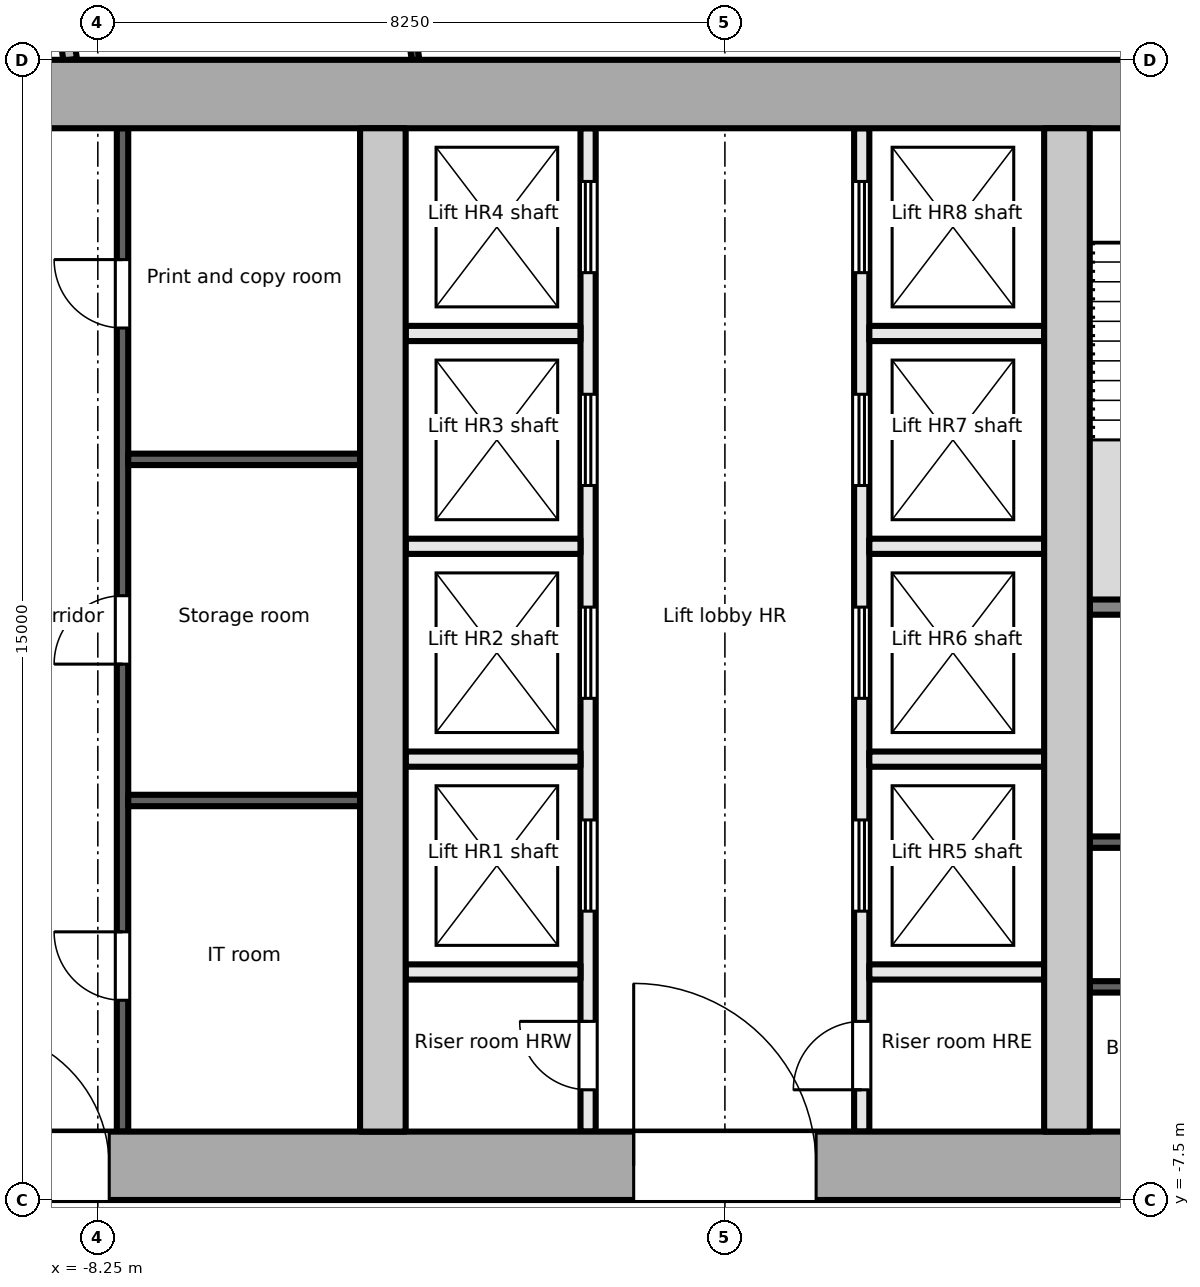
"""IFC4 building model, lengths in metres.
Left out: names, types, materials, properties, quantities, classifications, styles, units other than length and angle.
Written with IfcOpenShell. Run it as: python <this file> out.ifc"""

import sys

from ifc_helpers import new_model, si_unit, direction, frame, frame_2d, origin, place, context, subcontext, project, spatial, rectangle, extrude, element, fill, save


model = new_model("IFC4")
c1 = context("Model", 3, precision=1e-05, world=origin(), true_north=direction((0.0, 1.0)))
c2 = subcontext(c1, "Body", "Model", "MODEL_VIEW")
j1 = project(units=[si_unit("LENGTHUNIT", "METRE"), si_unit("PLANEANGLEUNIT", "RADIAN")], contexts=[c1])
p1 = place(None, origin())
s1 = spatial("IfcSite", under=j1, at=p1, CompositionType="ELEMENT")
p2 = place(p1, origin())
s2 = spatial("IfcBuilding", under=s1, at=p2, CompositionType="ELEMENT")
p3 = place(p2, frame((0.0, 0.0, 259.0)))
s3 = spatial("IfcBuildingStorey", under=s2, at=p3, CompositionType="ELEMENT", Elevation=259.0)
p4 = place(p3, frame((-18.0, -7.05, -0.2), z_axis=(0.0, 0.0, 1.0), x_axis=(1.0, 0.0, 0.0)))
e1 = element("IfcWall", 1, at=p4, inside=s3, PredefinedType="SHEAR", context=c2, shape_type="SweptSolid", body=[
    extrude(rectangle(XDim=36.0, YDim=0.9, at=frame_2d((18.0, 0.0))), origin(), (0.0, 0.0, 1.0), 3.9),
])
p5 = place(p4, frame((8.1, 0.0, 0.2)))
e2 = element("IfcOpeningElement", 2, at=p5, cuts=e1, PredefinedType="OPENING", context=c2, shape_type="SweptSolid", body=[
    extrude(rectangle(XDim=1.8, YDim=2.1, at=frame_2d((0.9, 1.05))), frame((0.0, 0.46, 0.0), z_axis=(0.0, -1.0, 0.0), x_axis=(1.0, 0.0, 0.0)), (0.0, 0.0, 1.0), 0.921),
])
p6 = place(p4, frame((16.8, 0.0, 0.2)))
e3 = element("IfcOpeningElement", 3, at=p6, cuts=e1, PredefinedType="OPENING", context=c2, shape_type="SweptSolid", body=[
    extrude(rectangle(XDim=2.4, YDim=2.1, at=frame_2d((1.2, 1.05))), frame((0.0, 0.46, 0.0), z_axis=(0.0, -1.0, 0.0), x_axis=(1.0, 0.0, 0.0)), (0.0, 0.0, 1.0), 0.921),
])
p7 = place(p4, frame((26.1, 0.0, 0.2)))
e4 = element("IfcOpeningElement", 4, at=p7, cuts=e1, PredefinedType="OPENING", context=c2, shape_type="SweptSolid", body=[
    extrude(rectangle(XDim=2.4, YDim=2.1, at=frame_2d((1.2, 1.05))), frame((0.0, 0.46, 0.0), z_axis=(0.0, -1.0, 0.0), x_axis=(1.0, 0.0, 0.0)), (0.0, 0.0, 1.0), 0.921),
])
p8 = place(p3, frame((-18.0, 7.05, -0.2), z_axis=(0.0, 0.0, 1.0), x_axis=(1.0, 0.0, 0.0)))
e5 = element("IfcWall", 5, at=p8, inside=s3, PredefinedType="SHEAR", context=c2, shape_type="SweptSolid", body=[
    extrude(rectangle(XDim=36.0, YDim=0.9, at=frame_2d((18.0, 0.0))), origin(), (0.0, 0.0, 1.0), 3.9),
])
for number, where, z_axis, x_axis in (
    (6, (-4.5, -6.6, -0.2), (0.0, 0.0, 1.0), (0.0, 1.0, 0.0)),
    (7, (4.5, -6.6, -0.2), (0.0, 0.0, 1.0), (0.0, 1.0, 0.0)),
):
    element("IfcWall", number, at=place(p3, frame(where, z_axis=z_axis, x_axis=x_axis)), inside=s3, PredefinedType="SHEAR", context=c2, shape_type="SweptSolid", body=[
        extrude(rectangle(XDim=13.2, YDim=0.6, at=frame_2d((6.6, 0.0))), origin(), (0.0, 0.0, 1.0), 3.9),
    ])
p9 = place(p3, frame((-7.925, -6.6, 0.0), z_axis=(0.0, 0.0, 1.0), x_axis=(0.0, 1.0, 0.0)))
e8 = element("IfcWall", 8, at=p9, inside=s3, PredefinedType="PARTITIONING", context=c2, shape_type="SweptSolid", body=[
    extrude(rectangle(XDim=13.2, YDim=0.15, at=frame_2d((6.6, 0.0))), origin(), (0.0, 0.0, 1.0), 3.7),
])
p10 = place(p9, frame((1.728, 0.0, 0.0)))
e9 = element("IfcOpeningElement", 9, at=p10, cuts=e8, PredefinedType="OPENING", context=c2, shape_type="SweptSolid", body=[
    extrude(rectangle(XDim=0.9, YDim=2.1, at=frame_2d((0.45, 1.05))), frame((0.0, 0.085, 0.0), z_axis=(0.0, -1.0, 0.0), x_axis=(1.0, 0.0, 0.0)), (0.0, 0.0, 1.0), 0.171),
])
p11 = place(p9, frame((6.15, 0.0, 0.0)))
e10 = element("IfcOpeningElement", 10, at=p11, cuts=e8, PredefinedType="OPENING", context=c2, shape_type="SweptSolid", body=[
    extrude(rectangle(XDim=0.9, YDim=2.1, at=frame_2d((0.45, 1.05))), frame((0.0, 0.085, 0.0), z_axis=(0.0, -1.0, 0.0), x_axis=(1.0, 0.0, 0.0)), (0.0, 0.0, 1.0), 0.171),
])
p12 = place(p9, frame((10.572, 0.0, 0.0)))
e11 = element("IfcOpeningElement", 11, at=p12, cuts=e8, PredefinedType="OPENING", context=c2, shape_type="SweptSolid", body=[
    extrude(rectangle(XDim=0.9, YDim=2.1, at=frame_2d((0.45, 1.05))), frame((0.0, 0.085, 0.0), z_axis=(0.0, -1.0, 0.0), x_axis=(1.0, 0.0, 0.0)), (0.0, 0.0, 1.0), 0.171),
])
for number, where, z_axis, x_axis in (
    (12, (-7.85, -2.244, 0.0), (0.0, 0.0, 1.0), (1.0, 0.0, 0.0)),
    (13, (-7.85, 2.244, 0.0), (0.0, 0.0, 1.0), (1.0, 0.0, 0.0)),
):
    element("IfcWall", number, at=place(p3, frame(where, z_axis=z_axis, x_axis=x_axis)), inside=s3, PredefinedType="PARTITIONING", context=c2, shape_type="SweptSolid", body=[
        extrude(rectangle(XDim=3.05, YDim=0.15, at=frame_2d((1.525, 0.0))), origin(), (0.0, 0.0, 1.0), 3.7),
    ])
p13 = place(p3, frame((-1.8, -6.6, 0.0), z_axis=(0.0, 0.0, 1.0), x_axis=(0.0, 1.0, 0.0)))
e14 = element("IfcWall", 14, at=p13, inside=s3, PredefinedType="PARTITIONING", context=c2, shape_type="SweptSolid", body=[
    extrude(rectangle(XDim=13.2, YDim=0.2, at=frame_2d((6.6, 0.0))), origin(), (0.0, 0.0, 1.0), 3.7),
])
p14 = place(p13, frame((0.55, 0.0, 0.0)))
e15 = element("IfcOpeningElement", 15, at=p14, cuts=e14, PredefinedType="OPENING", context=c2, shape_type="SweptSolid", body=[
    extrude(rectangle(XDim=0.9, YDim=2.1, at=frame_2d((0.45, 1.05))), frame((0.0, 0.111, 0.0), z_axis=(0.0, -1.0, 0.0), x_axis=(1.0, 0.0, 0.0)), (0.0, 0.0, 1.0), 0.221),
])
p15 = place(p13, frame((2.9, 0.0, 0.0)))
e16 = element("IfcOpeningElement", 16, at=p15, cuts=e14, PredefinedType="OPENING", context=c2, shape_type="SweptSolid", body=[
    extrude(rectangle(XDim=1.2, YDim=2.1, at=frame_2d((0.6, 1.05))), frame((0.0, 0.111, 0.0), z_axis=(0.0, -1.0, 0.0), x_axis=(1.0, 0.0, 0.0)), (0.0, 0.0, 1.0), 0.221),
])
p16 = place(p13, frame((5.7, 0.0, 0.0)))
e17 = element("IfcOpeningElement", 17, at=p16, cuts=e14, PredefinedType="OPENING", context=c2, shape_type="SweptSolid", body=[
    extrude(rectangle(XDim=1.2, YDim=2.1, at=frame_2d((0.6, 1.05))), frame((0.0, 0.111, 0.0), z_axis=(0.0, -1.0, 0.0), x_axis=(1.0, 0.0, 0.0)), (0.0, 0.0, 1.0), 0.221),
])
p17 = place(p13, frame((8.5, 0.0, 0.0)))
e18 = element("IfcOpeningElement", 18, at=p17, cuts=e14, PredefinedType="OPENING", context=c2, shape_type="SweptSolid", body=[
    extrude(rectangle(XDim=1.2, YDim=2.1, at=frame_2d((0.6, 1.05))), frame((0.0, 0.111, 0.0), z_axis=(0.0, -1.0, 0.0), x_axis=(1.0, 0.0, 0.0)), (0.0, 0.0, 1.0), 0.221),
])
p18 = place(p13, frame((11.3, 0.0, 0.0)))
e19 = element("IfcOpeningElement", 19, at=p18, cuts=e14, PredefinedType="OPENING", context=c2, shape_type="SweptSolid", body=[
    extrude(rectangle(XDim=1.2, YDim=2.1, at=frame_2d((0.6, 1.05))), frame((0.0, 0.111, 0.0), z_axis=(0.0, -1.0, 0.0), x_axis=(1.0, 0.0, 0.0)), (0.0, 0.0, 1.0), 0.221),
])
p19 = place(p3, frame((1.8, -6.6, 0.0), z_axis=(0.0, 0.0, 1.0), x_axis=(0.0, 1.0, 0.0)))
e20 = element("IfcWall", 20, at=p19, inside=s3, PredefinedType="PARTITIONING", context=c2, shape_type="SweptSolid", body=[
    extrude(rectangle(XDim=13.2, YDim=0.2, at=frame_2d((6.6, 0.0))), origin(), (0.0, 0.0, 1.0), 3.7),
])
p20 = place(p19, frame((0.55, 0.0, 0.0)))
e21 = element("IfcOpeningElement", 21, at=p20, cuts=e20, PredefinedType="OPENING", context=c2, shape_type="SweptSolid", body=[
    extrude(rectangle(XDim=0.9, YDim=2.1, at=frame_2d((0.45, 1.05))), frame((0.0, 0.111, 0.0), z_axis=(0.0, -1.0, 0.0), x_axis=(1.0, 0.0, 0.0)), (0.0, 0.0, 1.0), 0.221),
])
p21 = place(p19, frame((2.9, 0.0, 0.0)))
e22 = element("IfcOpeningElement", 22, at=p21, cuts=e20, PredefinedType="OPENING", context=c2, shape_type="SweptSolid", body=[
    extrude(rectangle(XDim=1.2, YDim=2.1, at=frame_2d((0.6, 1.05))), frame((0.0, 0.111, 0.0), z_axis=(0.0, -1.0, 0.0), x_axis=(1.0, 0.0, 0.0)), (0.0, 0.0, 1.0), 0.221),
])
p22 = place(p19, frame((5.7, 0.0, 0.0)))
e23 = element("IfcOpeningElement", 23, at=p22, cuts=e20, PredefinedType="OPENING", context=c2, shape_type="SweptSolid", body=[
    extrude(rectangle(XDim=1.2, YDim=2.1, at=frame_2d((0.6, 1.05))), frame((0.0, 0.111, 0.0), z_axis=(0.0, -1.0, 0.0), x_axis=(1.0, 0.0, 0.0)), (0.0, 0.0, 1.0), 0.221),
])
p23 = place(p19, frame((8.5, 0.0, 0.0)))
e24 = element("IfcOpeningElement", 24, at=p23, cuts=e20, PredefinedType="OPENING", context=c2, shape_type="SweptSolid", body=[
    extrude(rectangle(XDim=1.2, YDim=2.1, at=frame_2d((0.6, 1.05))), frame((0.0, 0.111, 0.0), z_axis=(0.0, -1.0, 0.0), x_axis=(1.0, 0.0, 0.0)), (0.0, 0.0, 1.0), 0.221),
])
p24 = place(p19, frame((11.3, 0.0, 0.0)))
e25 = element("IfcOpeningElement", 25, at=p24, cuts=e20, PredefinedType="OPENING", context=c2, shape_type="SweptSolid", body=[
    extrude(rectangle(XDim=1.2, YDim=2.1, at=frame_2d((0.6, 1.05))), frame((0.0, 0.111, 0.0), z_axis=(0.0, -1.0, 0.0), x_axis=(1.0, 0.0, 0.0)), (0.0, 0.0, 1.0), 0.221),
])
for number, where, z_axis, x_axis in (
    (26, (-4.2, -1.7, 0.0), (0.0, 0.0, 1.0), (1.0, 0.0, 0.0)),
    (27, (-4.2, 1.1, 0.0), (0.0, 0.0, 1.0), (1.0, 0.0, 0.0)),
    (28, (-4.2, 3.9, 0.0), (0.0, 0.0, 1.0), (1.0, 0.0, 0.0)),
    (29, (-4.2, -4.5, 0.0), (0.0, 0.0, 1.0), (1.0, 0.0, 0.0)),
    (30, (1.9, -1.7, 0.0), (0.0, 0.0, 1.0), (1.0, 0.0, 0.0)),
    (31, (1.9, 1.1, 0.0), (0.0, 0.0, 1.0), (1.0, 0.0, 0.0)),
    (32, (1.9, 3.9, 0.0), (0.0, 0.0, 1.0), (1.0, 0.0, 0.0)),
    (33, (1.9, -4.5, 0.0), (0.0, 0.0, 1.0), (1.0, 0.0, 0.0)),
):
    element("IfcWall", number, at=place(p3, frame(where, z_axis=z_axis, x_axis=x_axis)), inside=s3, PredefinedType="PARTITIONING", context=c2, shape_type="SweptSolid", body=[
        extrude(rectangle(XDim=2.3, YDim=0.2, at=frame_2d((1.15, 0.0))), origin(), (0.0, 0.0, 1.0), 3.7),
    ])
p25 = place(p3, frame((4.8, 0.3, 0.0), z_axis=(0.0, 0.0, 1.0), x_axis=(1.0, 0.0, 0.0)))
e34 = element("IfcWall", 34, at=p25, inside=s3, PredefinedType="PARTITIONING", context=c2, shape_type="SweptSolid", body=[
    extrude(rectangle(XDim=3.15, YDim=0.2, at=frame_2d((1.575, 0.0))), origin(), (0.0, 0.0, 1.0), 3.7),
])
for number, where, z_axis, x_axis in (
    (35, (4.8, -4.696, 0.0), (0.0, 0.0, 1.0), (1.0, 0.0, 0.0)),
    (36, (4.8, -2.792, 0.0), (0.0, 0.0, 1.0), (1.0, 0.0, 0.0)),
):
    element("IfcWall", number, at=place(p3, frame(where, z_axis=z_axis, x_axis=x_axis)), inside=s3, PredefinedType="PARTITIONING", context=c2, shape_type="SweptSolid", body=[
        extrude(rectangle(XDim=3.15, YDim=0.15, at=frame_2d((1.575, 0.0))), origin(), (0.0, 0.0, 1.0), 3.7),
    ])
p26 = place(p3, frame((-9.273, 12.191, 0.0), z_axis=(0.0, 0.0, 1.0), x_axis=(0.139104789371, -0.990277666907, 0.0)))
e37 = element("IfcWall", 37, at=p26, inside=s3, PredefinedType="PARTITIONING", context=c2, shape_type="SweptSolid", body=[
    extrude(rectangle(XDim=4.737, YDim=0.18, at=frame_2d((2.369, 0.0))), origin(), (0.0, 0.0, 1.0), 3.4),
])
p27 = place(p3, frame((-4.07, 7.5, 0.0), z_axis=(0.0, 0.0, 1.0), x_axis=(-0.139122430522, 0.990275188685, 0.0)))
e38 = element("IfcWall", 38, at=p27, inside=s3, PredefinedType="PARTITIONING", context=c2, shape_type="SweptSolid", body=[
    extrude(rectangle(XDim=5.368, YDim=0.1, at=frame_2d((2.684, 0.0))), origin(), (0.0, 0.0, 1.0), 3.4),
])
p28 = place(p27, frame((3.098, 0.0, 0.0)))
e39 = element("IfcOpeningElement", 39, at=p28, cuts=e38, PredefinedType="OPENING", context=c2, shape_type="SweptSolid", body=[
    extrude(rectangle(XDim=0.8, YDim=2.1, at=frame_2d((0.4, 1.05))), frame((0.0, 0.061, 0.0), z_axis=(0.0, -1.0, 0.0), x_axis=(1.0, 0.0, 0.0)), (0.0, 0.0, 1.0), 0.121),
])
p29 = place(p27, frame((0.649, 0.0, 0.9)))
e40 = element("IfcOpeningElement", 40, at=p29, cuts=e38, PredefinedType="OPENING", context=c2, shape_type="SweptSolid", body=[
    extrude(rectangle(XDim=1.8, YDim=1.2, at=frame_2d((0.9, 0.6))), frame((0.0, 0.061, 0.0), z_axis=(0.0, -1.0, 0.0), x_axis=(1.0, 0.0, 0.0)), (0.0, 0.0, 1.0), 0.121),
])
p30 = place(p10, origin())
e41 = element("IfcDoor", 41, at=p30, inside=s3, OperationType="SINGLE_SWING_RIGHT", PredefinedType="DOOR", context=c2, shape_type="SweptSolid", body=[
    extrude(rectangle(XDim=0.9, YDim=2.1, at=frame_2d((0.45, 1.05))), frame((0.0, 0.025, 0.0), z_axis=(0.0, -1.0, 0.0), x_axis=(1.0, 0.0, 0.0)), (0.0, 0.0, 1.0), 0.05),
])
fill(e9, e41)
p31 = place(p11, origin())
e42 = element("IfcDoor", 42, at=p31, inside=s3, OperationType="SINGLE_SWING_LEFT", PredefinedType="DOOR", context=c2, shape_type="SweptSolid", body=[
    extrude(rectangle(XDim=0.9, YDim=2.1, at=frame_2d((0.45, 1.05))), frame((0.0, 0.025, 0.0), z_axis=(0.0, -1.0, 0.0), x_axis=(1.0, 0.0, 0.0)), (0.0, 0.0, 1.0), 0.05),
])
fill(e10, e42)
p32 = place(p12, origin())
e43 = element("IfcDoor", 43, at=p32, inside=s3, OperationType="SINGLE_SWING_RIGHT", PredefinedType="DOOR", context=c2, shape_type="SweptSolid", body=[
    extrude(rectangle(XDim=0.9, YDim=2.1, at=frame_2d((0.45, 1.05))), frame((0.0, 0.025, 0.0), z_axis=(0.0, -1.0, 0.0), x_axis=(1.0, 0.0, 0.0)), (0.0, 0.0, 1.0), 0.05),
])
fill(e11, e43)
p33 = place(p5, origin())
e44 = element("IfcDoor", 44, at=p33, inside=s3, OperationType="SINGLE_SWING_LEFT", PredefinedType="DOOR", context=c2, shape_type="SweptSolid", body=[
    extrude(rectangle(XDim=1.8, YDim=2.1, at=frame_2d((0.9, 1.05))), frame((0.0, 0.025, 0.0), z_axis=(0.0, -1.0, 0.0), x_axis=(1.0, 0.0, 0.0)), (0.0, 0.0, 1.0), 0.05),
])
fill(e2, e44)
p34 = place(p14, origin())
e45 = element("IfcDoor", 45, at=p34, inside=s3, OperationType="SINGLE_SWING_RIGHT", PredefinedType="DOOR", context=c2, shape_type="SweptSolid", body=[
    extrude(rectangle(XDim=0.9, YDim=2.1, at=frame_2d((0.45, 1.05))), frame((0.0, 0.025, 0.0), z_axis=(0.0, -1.0, 0.0), x_axis=(1.0, 0.0, 0.0)), (0.0, 0.0, 1.0), 0.05),
])
fill(e15, e45)
p35 = place(p15, origin())
e46 = element("IfcDoor", 46, at=p35, inside=s3, OperationType="DOUBLE_DOOR_SLIDING", PredefinedType="DOOR", context=c2, shape_type="SweptSolid", body=[
    extrude(rectangle(XDim=1.2, YDim=2.1, at=frame_2d((0.6, 1.05))), frame((0.0, 0.025, 0.0), z_axis=(0.0, -1.0, 0.0), x_axis=(1.0, 0.0, 0.0)), (0.0, 0.0, 1.0), 0.05),
])
fill(e16, e46)
p36 = place(p16, origin())
e47 = element("IfcDoor", 47, at=p36, inside=s3, OperationType="DOUBLE_DOOR_SLIDING", PredefinedType="DOOR", context=c2, shape_type="SweptSolid", body=[
    extrude(rectangle(XDim=1.2, YDim=2.1, at=frame_2d((0.6, 1.05))), frame((0.0, 0.025, 0.0), z_axis=(0.0, -1.0, 0.0), x_axis=(1.0, 0.0, 0.0)), (0.0, 0.0, 1.0), 0.05),
])
fill(e17, e47)
p37 = place(p17, origin())
e48 = element("IfcDoor", 48, at=p37, inside=s3, OperationType="DOUBLE_DOOR_SLIDING", PredefinedType="DOOR", context=c2, shape_type="SweptSolid", body=[
    extrude(rectangle(XDim=1.2, YDim=2.1, at=frame_2d((0.6, 1.05))), frame((0.0, 0.025, 0.0), z_axis=(0.0, -1.0, 0.0), x_axis=(1.0, 0.0, 0.0)), (0.0, 0.0, 1.0), 0.05),
])
fill(e18, e48)
p38 = place(p18, origin())
e49 = element("IfcDoor", 49, at=p38, inside=s3, OperationType="DOUBLE_DOOR_SLIDING", PredefinedType="DOOR", context=c2, shape_type="SweptSolid", body=[
    extrude(rectangle(XDim=1.2, YDim=2.1, at=frame_2d((0.6, 1.05))), frame((0.0, 0.025, 0.0), z_axis=(0.0, -1.0, 0.0), x_axis=(1.0, 0.0, 0.0)), (0.0, 0.0, 1.0), 0.05),
])
fill(e19, e49)
p39 = place(p20, origin())
e50 = element("IfcDoor", 50, at=p39, inside=s3, OperationType="SINGLE_SWING_LEFT", PredefinedType="DOOR", context=c2, shape_type="SweptSolid", body=[
    extrude(rectangle(XDim=0.9, YDim=2.1, at=frame_2d((0.45, 1.05))), frame((0.0, 0.025, 0.0), z_axis=(0.0, -1.0, 0.0), x_axis=(1.0, 0.0, 0.0)), (0.0, 0.0, 1.0), 0.05),
])
fill(e21, e50)
p40 = place(p21, origin())
e51 = element("IfcDoor", 51, at=p40, inside=s3, OperationType="DOUBLE_DOOR_SLIDING", PredefinedType="DOOR", context=c2, shape_type="SweptSolid", body=[
    extrude(rectangle(XDim=1.2, YDim=2.1, at=frame_2d((0.6, 1.05))), frame((0.0, 0.025, 0.0), z_axis=(0.0, -1.0, 0.0), x_axis=(1.0, 0.0, 0.0)), (0.0, 0.0, 1.0), 0.05),
])
fill(e22, e51)
p41 = place(p22, origin())
e52 = element("IfcDoor", 52, at=p41, inside=s3, OperationType="DOUBLE_DOOR_SLIDING", PredefinedType="DOOR", context=c2, shape_type="SweptSolid", body=[
    extrude(rectangle(XDim=1.2, YDim=2.1, at=frame_2d((0.6, 1.05))), frame((0.0, 0.025, 0.0), z_axis=(0.0, -1.0, 0.0), x_axis=(1.0, 0.0, 0.0)), (0.0, 0.0, 1.0), 0.05),
])
fill(e23, e52)
p42 = place(p23, origin())
e53 = element("IfcDoor", 53, at=p42, inside=s3, OperationType="DOUBLE_DOOR_SLIDING", PredefinedType="DOOR", context=c2, shape_type="SweptSolid", body=[
    extrude(rectangle(XDim=1.2, YDim=2.1, at=frame_2d((0.6, 1.05))), frame((0.0, 0.025, 0.0), z_axis=(0.0, -1.0, 0.0), x_axis=(1.0, 0.0, 0.0)), (0.0, 0.0, 1.0), 0.05),
])
fill(e24, e53)
p43 = place(p24, origin())
e54 = element("IfcDoor", 54, at=p43, inside=s3, OperationType="DOUBLE_DOOR_SLIDING", PredefinedType="DOOR", context=c2, shape_type="SweptSolid", body=[
    extrude(rectangle(XDim=1.2, YDim=2.1, at=frame_2d((0.6, 1.05))), frame((0.0, 0.025, 0.0), z_axis=(0.0, -1.0, 0.0), x_axis=(1.0, 0.0, 0.0)), (0.0, 0.0, 1.0), 0.05),
])
fill(e25, e54)
p44 = place(p6, origin())
e55 = element("IfcDoor", 55, at=p44, inside=s3, OperationType="DOUBLE_DOOR_DOUBLE_SWING", PredefinedType="DOOR", context=c2, shape_type="SweptSolid", body=[
    extrude(rectangle(XDim=2.4, YDim=2.1, at=frame_2d((1.2, 1.05))), frame((0.0, 0.025, 0.0), z_axis=(0.0, -1.0, 0.0), x_axis=(1.0, 0.0, 0.0)), (0.0, 0.0, 1.0), 0.05),
])
fill(e3, e55)
save(model, sys.argv[1])
